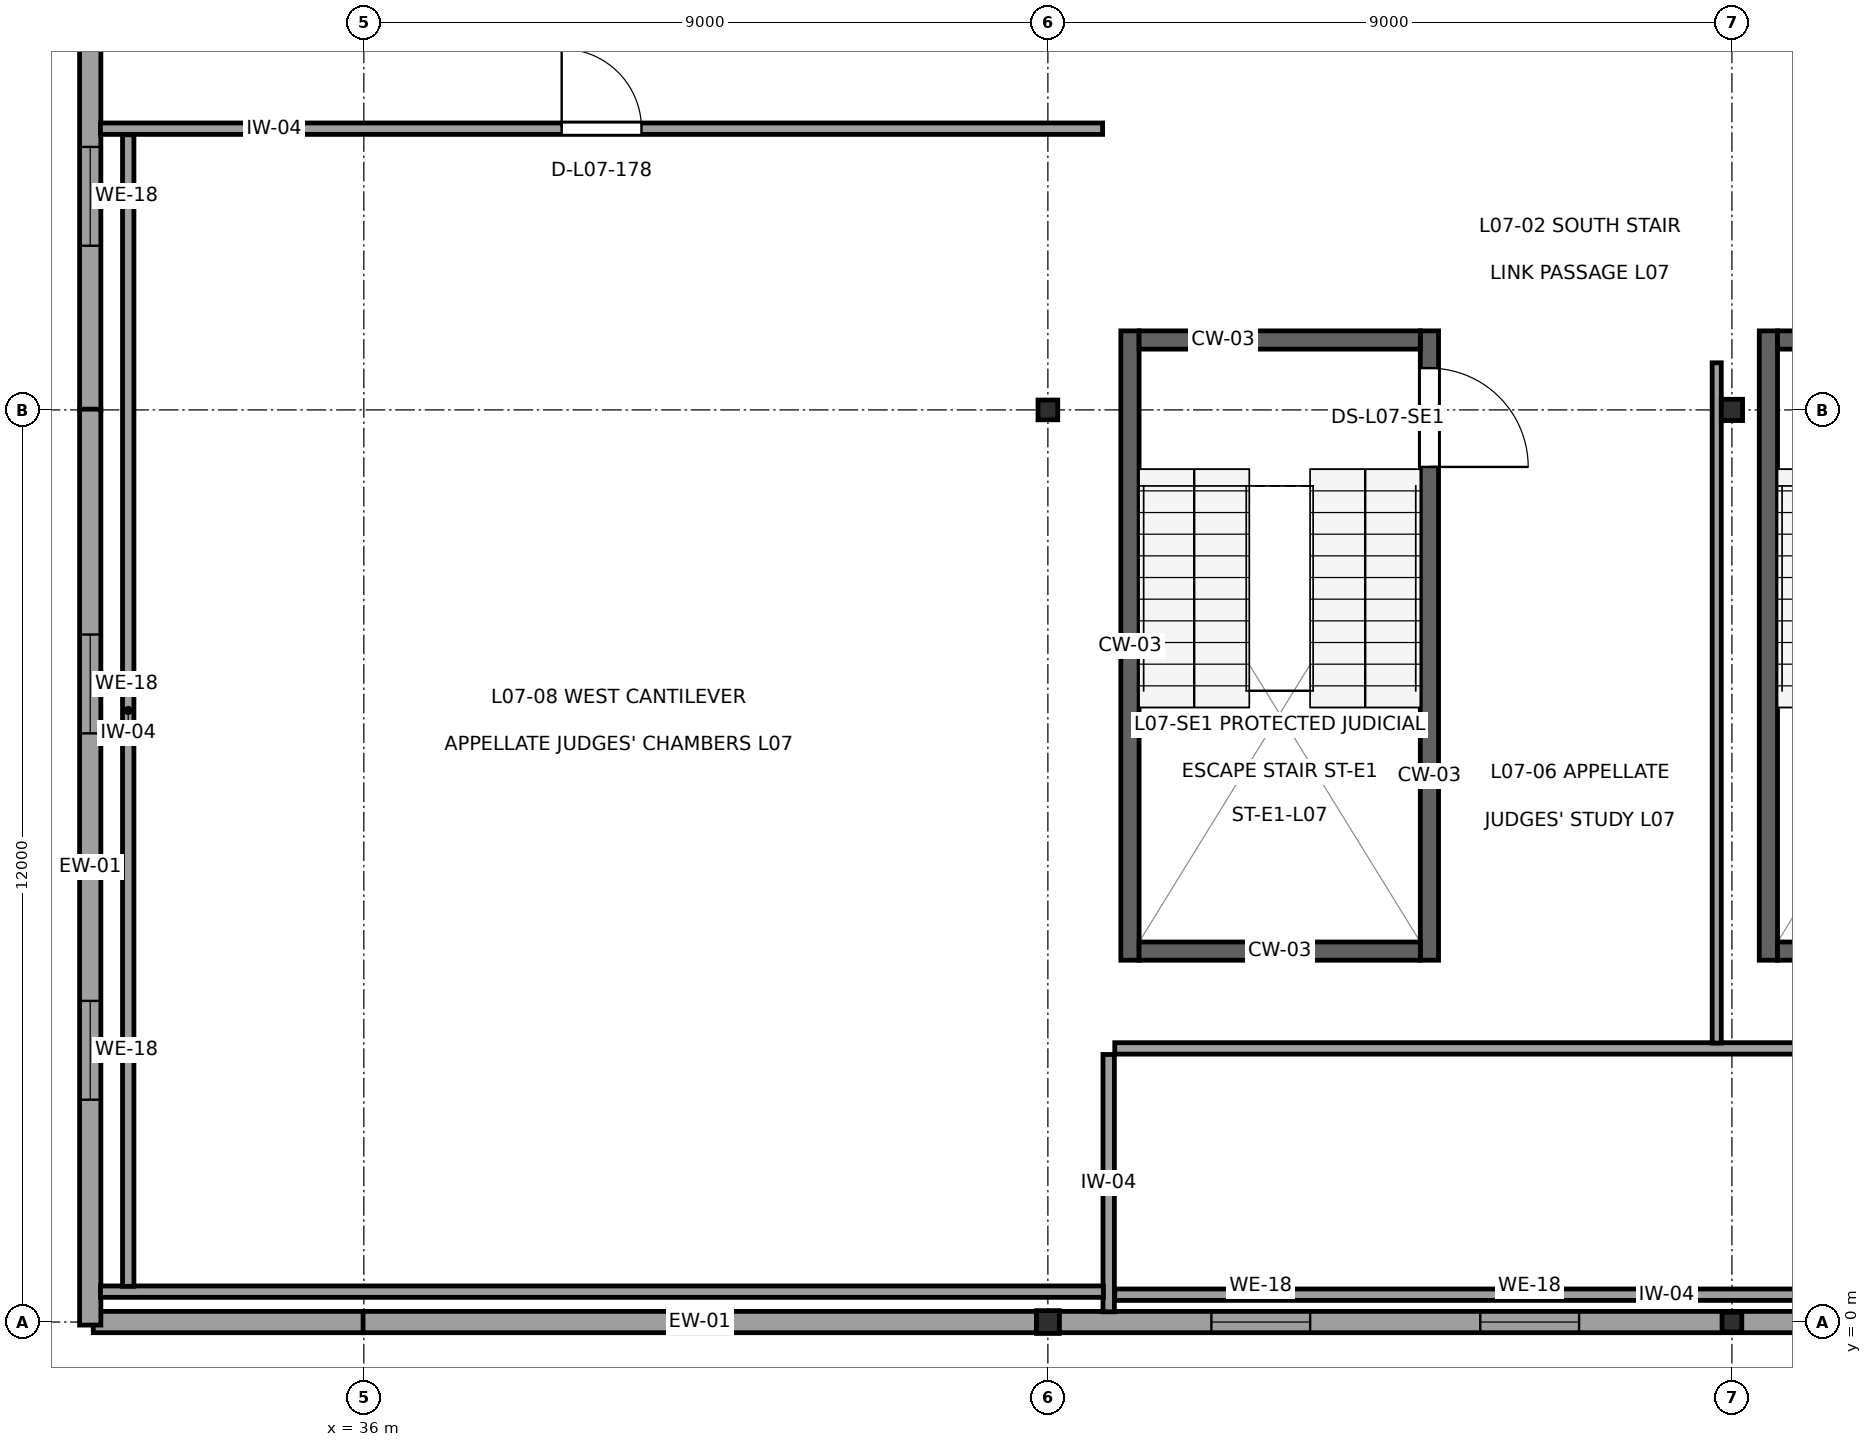
"""IFC4 building model, lengths in metres.
Left out: names, types, materials, properties, quantities, classifications, styles, units other than length and angle.
Written with IfcOpenShell. Run it as: python <this file> out.ifc"""

import sys

from ifc_helpers import new_model, si_unit, direction, frame, frame_2d, origin, origin_2d, place, context, subcontext, project, spatial, rectangle, i_section, extrude, element, fill, save


model = new_model("IFC4")
c1 = context("Model", 3, precision=1e-05, world=origin(), true_north=direction((0.0, 1.0)))
c2 = subcontext(c1, "Body", "Model", "MODEL_VIEW")
j1 = project(units=[si_unit("LENGTHUNIT", "METRE"), si_unit("PLANEANGLEUNIT", "RADIAN")], contexts=[c1])
p1 = place(None, origin())
s1 = spatial("IfcSite", under=j1, at=p1, CompositionType="ELEMENT")
p2 = place(p1, origin())
s2 = spatial("IfcBuilding", under=s1, at=p2, CompositionType="ELEMENT")
p3 = place(p2, frame((0.0, 0.0, 31.4)))
s3 = spatial("IfcBuildingStorey", under=s2, at=p3, CompositionType="ELEMENT", Elevation=31.4)
p4 = place(p3, frame((45.0, 0.0, 0.0), z_axis=(0.0, 0.0, 1.0), x_axis=(0.0, 1.0, 0.0)))
e1 = element("IfcColumn", 1, at=p4, inside=s3, PredefinedType="COLUMN", context=c2, shape_type="SweptSolid", body=[
    extrude(i_section(OverallWidth=0.3, OverallDepth=0.3, WebThickness=0.011, FlangeThickness=0.019, at=origin_2d()), origin(), (0.0, 0.0, 1.0), 4.0),
])
for number, where, z_axis, x_axis in (
    (2, (45.0, 12.0, 0.0), (0.0, 0.0, 1.0), (1.0, 0.0, 0.0)),
    (3, (54.0, 0.0, 0.0), (0.0, 0.0, 1.0), (1.0, 0.0, 0.0)),
):
    element("IfcColumn", number, at=place(p3, frame(where, z_axis=z_axis, x_axis=x_axis)), inside=s3, PredefinedType="COLUMN", context=c2, shape_type="SweptSolid", body=[
        extrude(i_section(OverallWidth=0.26, OverallDepth=0.26, WebThickness=0.01, FlangeThickness=0.018, at=origin_2d()), origin(), (0.0, 0.0, 1.0), 4.0),
    ])
p5 = place(p3, frame((54.0, 12.0, 0.0), z_axis=(0.0, 0.0, 1.0), x_axis=(1.0, 0.0, 0.0)))
e4 = element("IfcColumn", 4, at=p5, inside=s3, PredefinedType="COLUMN", context=c2, shape_type="SweptSolid", body=[
    extrude(i_section(OverallWidth=0.28, OverallDepth=0.28, WebThickness=0.01, FlangeThickness=0.018, at=origin_2d()), origin(), (0.0, 0.0, 1.0), 4.0),
])
p6 = place(p3, frame((32.44, 0.0, 0.0), z_axis=(0.0, 0.0, 1.0), x_axis=(1.0, 0.0, 0.0)))
e5 = element("IfcWall", 5, at=p6, inside=s3, PredefinedType="SOLIDWALL", context=c2, shape_type="SweptSolid", body=[
    extrude(rectangle(XDim=3.57, YDim=0.28, at=frame_2d((1.785, 0.0))), origin(), (0.0, 0.0, 1.0), 2.787),
])
p7 = place(p3, frame((35.99, 0.0, 0.0), z_axis=(0.0, 0.0, 1.0), x_axis=(1.0, 0.0, 0.0)))
e6 = element("IfcWall", 6, at=p7, inside=s3, PredefinedType="SOLIDWALL", context=c2, shape_type="SweptSolid", body=[
    extrude(rectangle(XDim=8.862, YDim=0.28, at=frame_2d((4.431, 0.0))), origin(), (0.0, 0.0, 1.0), 2.787),
])
p8 = place(p3, frame((45.148, 0.0, 0.0), z_axis=(0.0, 0.0, 1.0), x_axis=(1.0, 0.0, 0.0)))
e7 = element("IfcWall", 7, at=p8, inside=s3, PredefinedType="SOLIDWALL", context=c2, shape_type="SweptSolid", body=[
    extrude(rectangle(XDim=8.844, YDim=0.28, at=frame_2d((4.422, 0.0))), origin(), (0.0, 0.0, 1.0), 2.787),
])
p9 = place(p8, frame((2.003, 0.0, 1.05)))
e8 = element("IfcOpeningElement", 8, at=p9, cuts=e7, PredefinedType="OPENING", context=c2, shape_type="SweptSolid", body=[
    extrude(rectangle(XDim=1.3, YDim=1.3, at=frame_2d((0.65, 0.65))), frame((0.0, 0.155, 0.0), z_axis=(0.0, -1.0, 0.0), x_axis=(1.0, 0.0, 0.0)), (0.0, 0.0, 1.0), 0.31),
])
p10 = place(p8, frame((5.541, 0.0, 1.05)))
e9 = element("IfcOpeningElement", 9, at=p10, cuts=e7, PredefinedType="OPENING", context=c2, shape_type="SweptSolid", body=[
    extrude(rectangle(XDim=1.3, YDim=1.3, at=frame_2d((0.65, 0.65))), frame((0.0, 0.155, 0.0), z_axis=(0.0, -1.0, 0.0), x_axis=(1.0, 0.0, 0.0)), (0.0, 0.0, 1.0), 0.31),
])
p11 = place(p3, frame((54.008, 0.0, 0.0), z_axis=(0.0, 0.0, 1.0), x_axis=(1.0, 0.0, 0.0)))
e10 = element("IfcWall", 10, at=p11, inside=s3, PredefinedType="SOLIDWALL", context=c2, shape_type="SweptSolid", body=[
    extrude(rectangle(XDim=8.984, YDim=0.28, at=frame_2d((4.492, 0.0))), origin(), (0.0, 0.0, 1.0), 2.787),
])
p12 = place(p11, frame((2.045, 0.0, 1.05)))
e11 = element("IfcOpeningElement", 11, at=p12, cuts=e10, PredefinedType="OPENING", context=c2, shape_type="SweptSolid", body=[
    extrude(rectangle(XDim=1.3, YDim=1.3, at=frame_2d((0.65, 0.65))), frame((0.0, 0.155, 0.0), z_axis=(0.0, -1.0, 0.0), x_axis=(1.0, 0.0, 0.0)), (0.0, 0.0, 1.0), 0.31),
])
p13 = place(p11, frame((5.639, 0.0, 1.05)))
e12 = element("IfcOpeningElement", 12, at=p13, cuts=e10, PredefinedType="OPENING", context=c2, shape_type="SweptSolid", body=[
    extrude(rectangle(XDim=1.3, YDim=1.3, at=frame_2d((0.65, 0.65))), frame((0.0, 0.155, 0.0), z_axis=(0.0, -1.0, 0.0), x_axis=(1.0, 0.0, 0.0)), (0.0, 0.0, 1.0), 0.31),
])
p14 = place(p3, frame((32.4, 23.96, 0.0), z_axis=(0.0, 0.0, 1.0), x_axis=(0.0, -1.0, 0.0)))
e13 = element("IfcWall", 13, at=p14, inside=s3, PredefinedType="SOLIDWALL", context=c2, shape_type="SweptSolid", body=[
    extrude(rectangle(XDim=11.97, YDim=0.28, at=frame_2d((5.985, 0.0))), origin(), (0.0, 0.0, 1.0), 3.095),
])
p15 = place(p14, frame((2.941, 0.0, 1.05)))
e14 = element("IfcOpeningElement", 14, at=p15, cuts=e13, PredefinedType="OPENING", context=c2, shape_type="SweptSolid", body=[
    extrude(rectangle(XDim=1.3, YDim=1.3, at=frame_2d((0.65, 0.65))), frame((0.0, 0.155, 0.0), z_axis=(0.0, -1.0, 0.0), x_axis=(1.0, 0.0, 0.0)), (0.0, 0.0, 1.0), 0.31),
])
p16 = place(p14, frame((8.5, 0.0, 1.05)))
e15 = element("IfcOpeningElement", 15, at=p16, cuts=e13, PredefinedType="OPENING", context=c2, shape_type="SweptSolid", body=[
    extrude(rectangle(XDim=1.3, YDim=1.3, at=frame_2d((0.65, 0.65))), frame((0.0, 0.155, 0.0), z_axis=(0.0, -1.0, 0.0), x_axis=(1.0, 0.0, 0.0)), (0.0, 0.0, 1.0), 0.31),
])
p17 = place(p3, frame((32.4, 12.01, 0.0), z_axis=(0.0, 0.0, 1.0), x_axis=(0.0, -1.0, 0.0)))
e16 = element("IfcWall", 16, at=p17, inside=s3, PredefinedType="SOLIDWALL", context=c2, shape_type="SweptSolid", body=[
    extrude(rectangle(XDim=12.05, YDim=0.28, at=frame_2d((6.025, 0.0))), origin(), (0.0, 0.0, 1.0), 3.095),
])
p18 = place(p17, frame((2.965, 0.0, 1.05)))
e17 = element("IfcOpeningElement", 17, at=p18, cuts=e16, PredefinedType="OPENING", context=c2, shape_type="SweptSolid", body=[
    extrude(rectangle(XDim=1.3, YDim=1.3, at=frame_2d((0.65, 0.65))), frame((0.0, 0.155, 0.0), z_axis=(0.0, -1.0, 0.0), x_axis=(1.0, 0.0, 0.0)), (0.0, 0.0, 1.0), 0.31),
])
p19 = place(p17, frame((7.785, 0.0, 1.05)))
e18 = element("IfcOpeningElement", 18, at=p19, cuts=e16, PredefinedType="OPENING", context=c2, shape_type="SweptSolid", body=[
    extrude(rectangle(XDim=1.3, YDim=1.3, at=frame_2d((0.65, 0.65))), frame((0.0, 0.155, 0.0), z_axis=(0.0, -1.0, 0.0), x_axis=(1.0, 0.0, 0.0)), (0.0, 0.0, 1.0), 0.31),
])
p20 = place(p3, frame((54.48, 4.76, 0.0), z_axis=(0.0, 0.0, 1.0), x_axis=(0.0, 1.0, 0.0)))
e19 = element("IfcWall", 19, at=p20, inside=s3, PredefinedType="SHEAR", context=c2, shape_type="SweptSolid", body=[
    extrude(rectangle(XDim=8.28, YDim=0.24, at=frame_2d((4.14, 0.0))), origin(), (0.0, 0.0, 1.0), 3.81),
])
for number, where, z_axis, x_axis in (
    (20, (54.6, 4.88, 0.0), (0.0, 0.0, 1.0), (1.0, 0.0, 0.0)),
    (21, (54.6, 12.92, 0.0), (0.0, 0.0, 1.0), (1.0, 0.0, 0.0)),
):
    element("IfcWall", number, at=place(p3, frame(where, z_axis=z_axis, x_axis=x_axis)), inside=s3, PredefinedType="SHEAR", context=c2, shape_type="SweptSolid", body=[
        extrude(rectangle(XDim=3.7, YDim=0.24, at=frame_2d((1.85, 0.0))), origin(), (0.0, 0.0, 1.0), 3.81),
    ])
p21 = place(p3, frame((46.08, 4.76, 0.0), z_axis=(0.0, 0.0, 1.0), x_axis=(0.0, 1.0, 0.0)))
e22 = element("IfcWall", 22, at=p21, inside=s3, PredefinedType="SHEAR", context=c2, shape_type="SweptSolid", body=[
    extrude(rectangle(XDim=8.28, YDim=0.24, at=frame_2d((4.14, 0.0))), origin(), (0.0, 0.0, 1.0), 3.81),
])
p22 = place(p3, frame((50.02, 4.76, 0.0), z_axis=(0.0, 0.0, 1.0), x_axis=(0.0, 1.0, 0.0)))
e23 = element("IfcWall", 23, at=p22, inside=s3, PredefinedType="SHEAR", context=c2, shape_type="SweptSolid", body=[
    extrude(rectangle(XDim=8.28, YDim=0.24, at=frame_2d((4.14, 0.0))), origin(), (0.0, 0.0, 1.0), 3.81),
])
p23 = place(p22, frame((6.49, 0.0, 0.0)))
e24 = element("IfcOpeningElement", 24, at=p23, cuts=e23, PredefinedType="OPENING", context=c2, shape_type="SweptSolid", body=[
    extrude(rectangle(XDim=1.3, YDim=2.2, at=frame_2d((0.65, 1.1))), frame((0.0, 0.135, 0.0), z_axis=(0.0, -1.0, 0.0), x_axis=(1.0, 0.0, 0.0)), (0.0, 0.0, 1.0), 0.27),
])
for number, where, z_axis, x_axis in (
    (25, (46.2, 4.88, 0.0), (0.0, 0.0, 1.0), (1.0, 0.0, 0.0)),
    (26, (46.2, 12.92, 0.0), (0.0, 0.0, 1.0), (1.0, 0.0, 0.0)),
):
    element("IfcWall", number, at=place(p3, frame(where, z_axis=z_axis, x_axis=x_axis)), inside=s3, PredefinedType="SHEAR", context=c2, shape_type="SweptSolid", body=[
        extrude(rectangle(XDim=3.7, YDim=0.24, at=frame_2d((1.85, 0.0))), origin(), (0.0, 0.0, 1.0), 3.81),
    ])
p24 = place(p3, frame((71.92, 0.36, 0.0), z_axis=(0.0, 0.0, 1.0), x_axis=(-1.0, 0.0, 0.0)))
e27 = element("IfcWall", 27, at=p24, inside=s3, PredefinedType="PARTITIONING", context=c2, shape_type="SweptSolid", body=[
    extrude(rectangle(XDim=26.04, YDim=0.15, at=frame_2d((13.02, 0.0))), origin(), (0.0, 0.0, 1.0), 3.64),
])
p25 = place(p3, frame((45.8, 0.135, 0.0), z_axis=(0.0, 0.0, 1.0), x_axis=(0.0, 1.0, 0.0)))
e28 = element("IfcWall", 28, at=p25, inside=s3, PredefinedType="PARTITIONING", context=c2, shape_type="SweptSolid", body=[
    extrude(rectangle(XDim=3.385, YDim=0.15, at=frame_2d((1.692, 0.0))), origin(), (0.0, 0.0, 1.0), 3.64),
])
p26 = place(p3, frame((45.88, 3.6, 0.0), z_axis=(0.0, 0.0, 1.0), x_axis=(1.0, 0.0, 0.0)))
e29 = element("IfcWall", 29, at=p26, inside=s3, PredefinedType="PARTITIONING", context=c2, shape_type="SweptSolid", body=[
    extrude(rectangle(XDim=58.24, YDim=0.15, at=frame_2d((29.12, 0.0))), origin(), (0.0, 0.0, 1.0), 3.64),
])
p27 = place(p26, frame((27.795, 0.0, 0.0)))
e30 = element("IfcOpeningElement", 30, at=p27, cuts=e29, PredefinedType="OPENING", context=c2, shape_type="SweptSolid", body=[
    extrude(rectangle(XDim=1.05, YDim=2.25, at=frame_2d((0.525, 1.125))), frame((0.0, 0.09, 0.0), z_axis=(0.0, -1.0, 0.0), x_axis=(1.0, 0.0, 0.0)), (0.0, 0.0, 1.0), 0.18),
])
p28 = place(p3, frame((53.8, 12.62, 0.0), z_axis=(0.0, 0.0, 1.0), x_axis=(0.0, -1.0, 0.0)))
e31 = element("IfcWall", 31, at=p28, inside=s3, PredefinedType="PARTITIONING", context=c2, shape_type="SweptSolid", body=[
    extrude(rectangle(XDim=8.95, YDim=0.12, at=frame_2d((4.475, 0.0))), origin(), (0.0, 0.0, 1.0), 3.355),
])
p29 = place(p3, frame((45.73, 0.4, 0.0), z_axis=(0.0, 0.0, 1.0), x_axis=(-1.0, 0.0, 0.0)))
e32 = element("IfcWall", 32, at=p29, inside=s3, PredefinedType="PARTITIONING", context=c2, shape_type="SweptSolid", body=[
    extrude(rectangle(XDim=13.195, YDim=0.15, at=frame_2d((6.598, 0.0))), origin(), (0.0, 0.0, 1.0), 3.64),
])
p30 = place(p3, frame((32.9, 0.47, 0.0), z_axis=(0.0, 0.0, 1.0), x_axis=(0.0, 1.0, 0.0)))
e33 = element("IfcWall", 33, at=p30, inside=s3, PredefinedType="PARTITIONING", context=c2, shape_type="SweptSolid", body=[
    extrude(rectangle(XDim=15.15, YDim=0.15, at=frame_2d((7.575, 0.0))), origin(), (0.0, 0.0, 1.0), 3.64),
])
p31 = place(p3, frame((32.535, 15.7, 0.0), z_axis=(0.0, 0.0, 1.0), x_axis=(1.0, 0.0, 0.0)))
e34 = element("IfcWall", 34, at=p31, inside=s3, PredefinedType="PARTITIONING", context=c2, shape_type="SweptSolid", body=[
    extrude(rectangle(XDim=13.185, YDim=0.15, at=frame_2d((6.593, 0.0))), origin(), (0.0, 0.0, 1.0), 3.64),
])
p32 = place(p31, frame((6.068, 0.0, 0.0)))
e35 = element("IfcOpeningElement", 35, at=p32, cuts=e34, PredefinedType="OPENING", context=c2, shape_type="SweptSolid", body=[
    extrude(rectangle(XDim=1.05, YDim=2.25, at=frame_2d((0.525, 1.125))), frame((0.0, 0.09, 0.0), z_axis=(0.0, -1.0, 0.0), x_axis=(1.0, 0.0, 0.0)), (0.0, 0.0, 1.0), 0.18),
])
p33 = place(p9, origin())
e36 = element("IfcWindow", 36, at=p33, inside=s3, PartitioningType="SINGLE_PANEL", PredefinedType="WINDOW", context=c2, shape_type="SweptSolid", body=[
    extrude(rectangle(XDim=1.3, YDim=1.3, at=frame_2d((0.65, 0.65))), frame((0.0, 0.03, 0.0), z_axis=(0.0, -1.0, 0.0), x_axis=(1.0, 0.0, 0.0)), (0.0, 0.0, 1.0), 0.06),
])
fill(e8, e36)
p34 = place(p10, origin())
e37 = element("IfcWindow", 37, at=p34, inside=s3, PartitioningType="SINGLE_PANEL", PredefinedType="WINDOW", context=c2, shape_type="SweptSolid", body=[
    extrude(rectangle(XDim=1.3, YDim=1.3, at=frame_2d((0.65, 0.65))), frame((0.0, 0.03, 0.0), z_axis=(0.0, -1.0, 0.0), x_axis=(1.0, 0.0, 0.0)), (0.0, 0.0, 1.0), 0.06),
])
fill(e9, e37)
p35 = place(p16, origin())
e38 = element("IfcWindow", 38, at=p35, inside=s3, PartitioningType="SINGLE_PANEL", PredefinedType="WINDOW", context=c2, shape_type="SweptSolid", body=[
    extrude(rectangle(XDim=1.3, YDim=1.3, at=frame_2d((0.65, 0.65))), frame((0.0, 0.03, 0.0), z_axis=(0.0, -1.0, 0.0), x_axis=(1.0, 0.0, 0.0)), (0.0, 0.0, 1.0), 0.06),
])
fill(e15, e38)
p36 = place(p18, origin())
e39 = element("IfcWindow", 39, at=p36, inside=s3, PartitioningType="SINGLE_PANEL", PredefinedType="WINDOW", context=c2, shape_type="SweptSolid", body=[
    extrude(rectangle(XDim=1.3, YDim=1.3, at=frame_2d((0.65, 0.65))), frame((0.0, 0.03, 0.0), z_axis=(0.0, -1.0, 0.0), x_axis=(1.0, 0.0, 0.0)), (0.0, 0.0, 1.0), 0.06),
])
fill(e17, e39)
p37 = place(p19, origin())
e40 = element("IfcWindow", 40, at=p37, inside=s3, PartitioningType="SINGLE_PANEL", PredefinedType="WINDOW", context=c2, shape_type="SweptSolid", body=[
    extrude(rectangle(XDim=1.3, YDim=1.3, at=frame_2d((0.65, 0.65))), frame((0.0, 0.03, 0.0), z_axis=(0.0, -1.0, 0.0), x_axis=(1.0, 0.0, 0.0)), (0.0, 0.0, 1.0), 0.06),
])
fill(e18, e40)
p38 = place(p23, frame((1.3, 0.0, 0.0), z_axis=(0.0, 0.0, 1.0), x_axis=(-1.0, 0.0, 0.0)))
e41 = element("IfcDoor", 41, at=p38, inside=s3, OperationType="SINGLE_SWING_LEFT", PredefinedType="DOOR", context=c2, shape_type="SweptSolid", body=[
    extrude(rectangle(XDim=1.3, YDim=2.2, at=frame_2d((0.65, 1.1))), frame((0.0, 0.025, 0.0), z_axis=(0.0, -1.0, 0.0), x_axis=(1.0, 0.0, 0.0)), (0.0, 0.0, 1.0), 0.05),
])
fill(e24, e41)
p39 = place(p32, origin())
e42 = element("IfcDoor", 42, at=p39, inside=s3, OperationType="SINGLE_SWING_LEFT", PredefinedType="DOOR", context=c2, shape_type="SweptSolid", body=[
    extrude(rectangle(XDim=1.05, YDim=2.25, at=frame_2d((0.525, 1.125))), frame((0.0, 0.025, 0.0), z_axis=(0.0, -1.0, 0.0), x_axis=(1.0, 0.0, 0.0)), (0.0, 0.0, 1.0), 0.05),
])
fill(e35, e42)
save(model, sys.argv[1])
